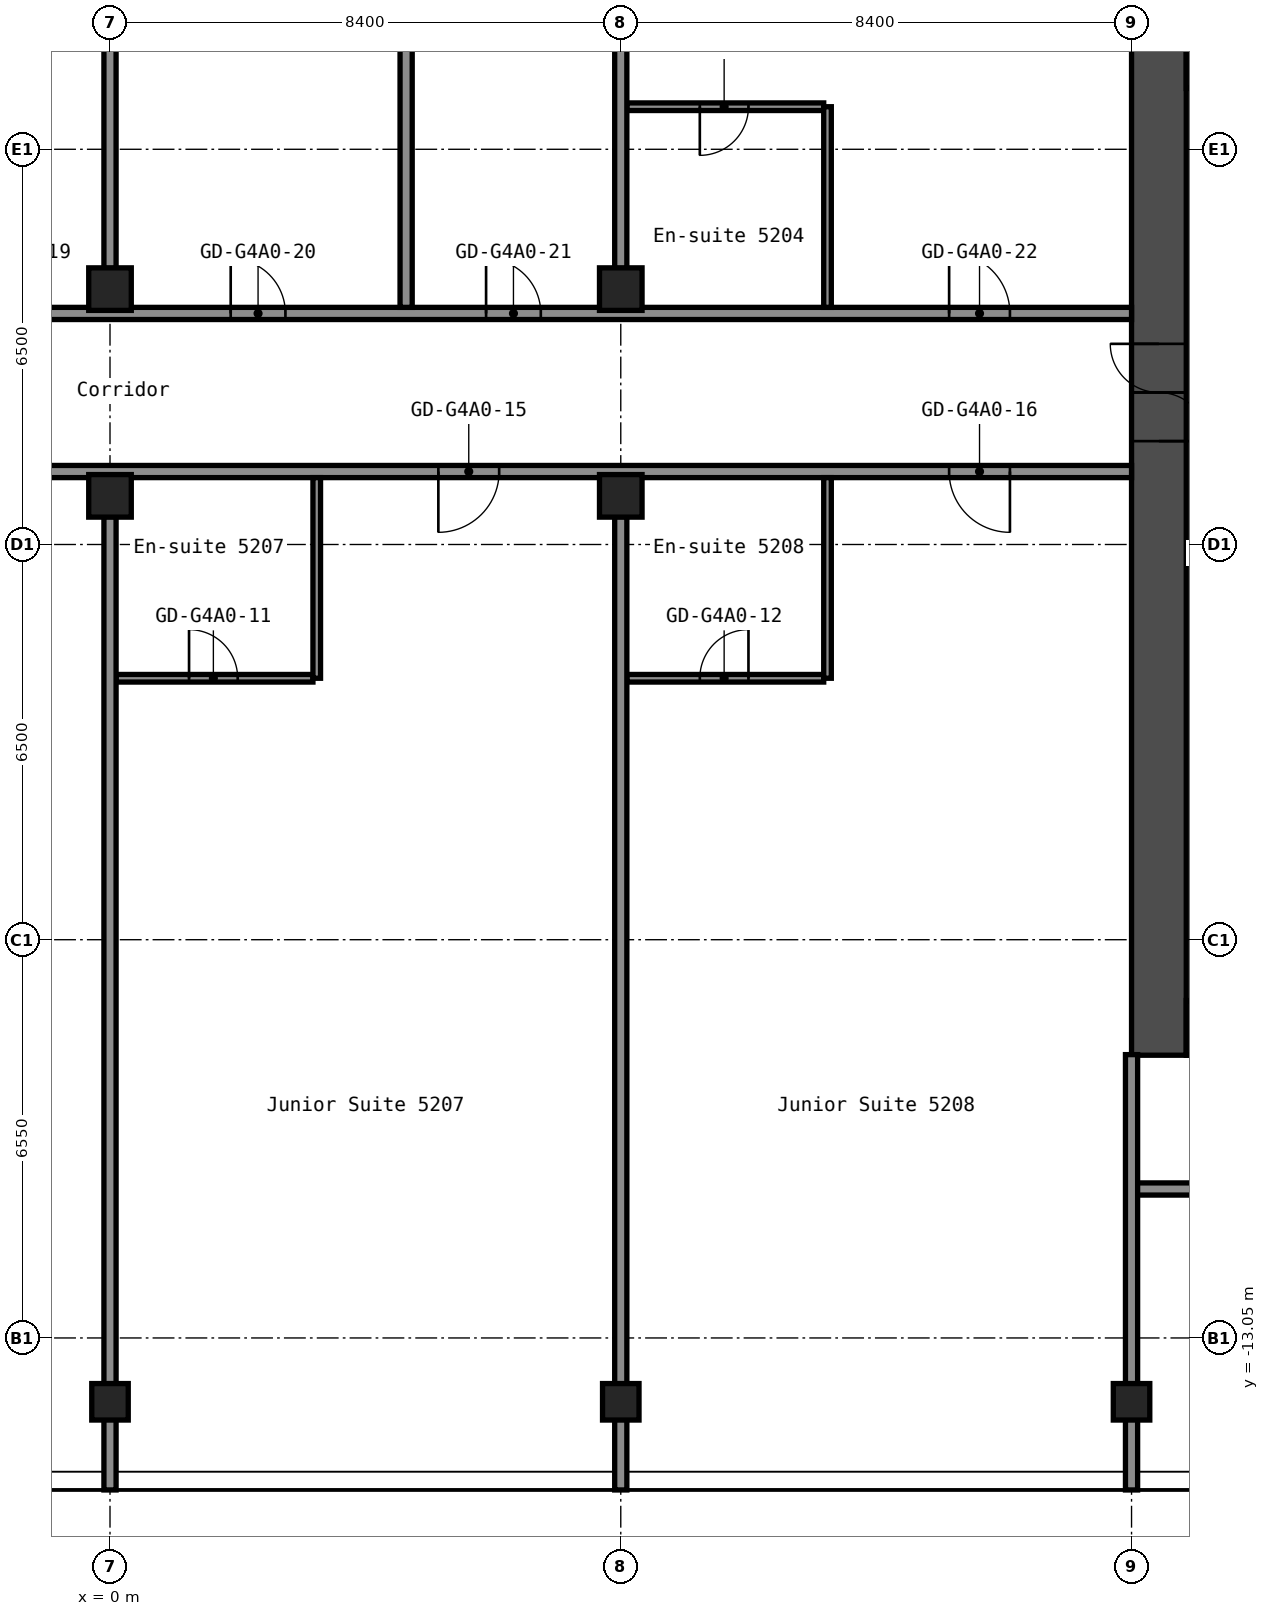
"""IFC4 building model, lengths in metres.
Left out: names, types, materials, properties, quantities, classifications, styles, units other than length and angle.
Written with IfcOpenShell. Run it as: python <this file> out.ifc"""

import sys

from ifc_helpers import new_model, si_unit, direction, frame, frame_2d, origin, origin_2d, place, context, subcontext, project, spatial, rectangle, hollow_rectangle, extrude, element, fill, save


model = new_model("IFC4")
c1 = context("Model", 3, precision=1e-05, world=origin(), true_north=direction((0.0, 1.0)))
c2 = subcontext(c1, "Body", "Model", "MODEL_VIEW")
j1 = project(units=[si_unit("LENGTHUNIT", "METRE"), si_unit("PLANEANGLEUNIT", "RADIAN")], contexts=[c1])
p1 = place(None, origin())
s1 = spatial("IfcSite", under=j1, at=p1, CompositionType="ELEMENT")
p2 = place(p1, origin())
s2 = spatial("IfcBuilding", under=s1, at=p2, CompositionType="ELEMENT")
p3 = place(p2, frame((0.0, 0.0, 186.6)))
s3 = spatial("IfcBuildingStorey", under=s2, at=p3, CompositionType="ELEMENT", Elevation=186.6)
p4 = place(p3, frame((0.0, -14.1, 0.0), z_axis=(0.0, 0.0, 1.0), x_axis=(1.0, 0.0, 0.0)))
e1 = element("IfcColumn", 1, at=p4, inside=s3, PredefinedType="COLUMN", context=c2, shape_type="SweptSolid", body=[
    extrude(hollow_rectangle(XDim=0.6, YDim=0.6, WallThickness=0.025, InnerFilletRadius=0.038, OuterFilletRadius=0.062, at=origin_2d()), origin(), (0.0, 0.0, 1.0), 2.75),
])
for number, where, z_axis, x_axis in (
    (2, (0.0, 0.8, 0.0), (0.0, 0.0, 1.0), (1.0, 0.0, 0.0)),
    (3, (0.0, 4.2, 0.0), (0.0, 0.0, 1.0), (1.0, 0.0, 0.0)),
):
    element("IfcColumn", number, at=place(p3, frame(where, z_axis=z_axis, x_axis=x_axis)), inside=s3, PredefinedType="COLUMN", context=c2, shape_type="SweptSolid", body=[
        extrude(hollow_rectangle(XDim=0.7, YDim=0.7, WallThickness=0.028, at=origin_2d()), origin(), (0.0, 0.0, 1.0), 2.75),
    ])
p5 = place(p3, frame((8.4, -14.1, 0.0), z_axis=(0.0, 0.0, 1.0), x_axis=(1.0, 0.0, 0.0)))
e4 = element("IfcColumn", 4, at=p5, inside=s3, PredefinedType="COLUMN", context=c2, shape_type="SweptSolid", body=[
    extrude(hollow_rectangle(XDim=0.6, YDim=0.6, WallThickness=0.025, InnerFilletRadius=0.038, OuterFilletRadius=0.062, at=origin_2d()), origin(), (0.0, 0.0, 1.0), 2.75),
])
for number, where, z_axis, x_axis in (
    (5, (8.4, 0.8, 0.0), (0.0, 0.0, 1.0), (1.0, 0.0, 0.0)),
    (6, (8.4, 4.2, 0.0), (0.0, 0.0, 1.0), (1.0, 0.0, 0.0)),
):
    element("IfcColumn", number, at=place(p3, frame(where, z_axis=z_axis, x_axis=x_axis)), inside=s3, PredefinedType="COLUMN", context=c2, shape_type="SweptSolid", body=[
        extrude(hollow_rectangle(XDim=0.7, YDim=0.7, WallThickness=0.028, at=origin_2d()), origin(), (0.0, 0.0, 1.0), 2.75),
    ])
p6 = place(p3, frame((16.8, -14.1, 0.0), z_axis=(0.0, 0.0, 1.0), x_axis=(1.0, 0.0, 0.0)))
e7 = element("IfcColumn", 7, at=p6, inside=s3, PredefinedType="COLUMN", context=c2, shape_type="SweptSolid", body=[
    extrude(hollow_rectangle(XDim=0.6, YDim=0.6, WallThickness=0.025, InnerFilletRadius=0.038, OuterFilletRadius=0.062, at=origin_2d()), origin(), (0.0, 0.0, 1.0), 2.75),
])
p7 = place(p3, frame((17.25, -8.4, 0.0), z_axis=(0.0, 0.0, 1.0), x_axis=(0.0, 1.0, 0.0)))
e8 = element("IfcWall", 8, at=p7, inside=s3, PredefinedType="SHEAR", context=c2, shape_type="SweptSolid", body=[
    extrude(rectangle(XDim=16.8, YDim=0.9, at=frame_2d((8.4, 0.0))), origin(), (0.0, 0.0, 1.0), 2.75),
])
p8 = place(p7, frame((10.1, 0.0, 0.0)))
e9 = element("IfcOpeningElement", 9, at=p8, cuts=e8, PredefinedType="OPENING", context=c2, shape_type="SweptSolid", body=[
    extrude(rectangle(XDim=1.6, YDim=2.1, at=frame_2d((0.8, 1.05))), frame((0.0, 0.46, 0.0), z_axis=(0.0, -1.0, 0.0), x_axis=(1.0, 0.0, 0.0)), (0.0, 0.0, 1.0), 0.92),
])
p9 = place(p3, frame((17.7, 7.95, 0.0), z_axis=(0.0, 0.0, 1.0), x_axis=(1.0, 0.0, 0.0)))
e10 = element("IfcWall", 10, at=p9, inside=s3, PredefinedType="SHEAR", context=c2, shape_type="SweptSolid", body=[
    extrude(rectangle(XDim=15.0, YDim=0.9, at=frame_2d((7.5, 0.0))), origin(), (0.0, 0.0, 1.0), 2.75),
])
p10 = place(p9, frame((10.4, 0.0, 0.0)))
e11 = element("IfcOpeningElement", 11, at=p10, cuts=e10, PredefinedType="OPENING", context=c2, shape_type="SweptSolid", body=[
    extrude(rectangle(XDim=1.2, YDim=2.1, at=frame_2d((0.6, 1.05))), frame((0.0, 0.46, 0.0), z_axis=(0.0, -1.0, 0.0), x_axis=(1.0, 0.0, 0.0)), (0.0, 0.0, 1.0), 0.92),
])
p11 = place(p9, frame((13.35, 0.0, 0.0)))
e12 = element("IfcOpeningElement", 12, at=p11, cuts=e10, PredefinedType="OPENING", context=c2, shape_type="SweptSolid", body=[
    extrude(rectangle(XDim=0.9, YDim=2.1, at=frame_2d((0.45, 1.05))), frame((0.0, 0.46, 0.0), z_axis=(0.0, -1.0, 0.0), x_axis=(1.0, 0.0, 0.0)), (0.0, 0.0, 1.0), 0.92),
])
p12 = place(p3, frame((17.7, -7.95, 0.0), z_axis=(0.0, 0.0, 1.0), x_axis=(1.0, 0.0, 0.0)))
e13 = element("IfcWall", 13, at=p12, inside=s3, PredefinedType="SHEAR", context=c2, shape_type="SweptSolid", body=[
    extrude(rectangle(XDim=15.0, YDim=0.9, at=frame_2d((7.5, 0.0))), origin(), (0.0, 0.0, 1.0), 2.75),
])
p13 = place(p12, frame((2.55, 0.0, 0.0)))
e14 = element("IfcOpeningElement", 14, at=p13, cuts=e13, PredefinedType="OPENING", context=c2, shape_type="SweptSolid", body=[
    extrude(rectangle(XDim=1.0, YDim=2.1, at=frame_2d((0.5, 1.05))), frame((0.0, 0.46, 0.0), z_axis=(0.0, -1.0, 0.0), x_axis=(1.0, 0.0, 0.0)), (0.0, 0.0, 1.0), 0.92),
])
p14 = place(p3, frame((16.8, -10.6, 0.0), z_axis=(0.0, 0.0, 1.0), x_axis=(1.0, 0.0, 0.0)))
e15 = element("IfcWall", 15, at=p14, inside=s3, PredefinedType="PARTITIONING", context=c2, shape_type="SweptSolid", body=[
    extrude(rectangle(XDim=21.3, YDim=0.2, at=frame_2d((10.65, 0.0))), origin(), (0.0, 0.0, 1.0), 2.75),
])
p15 = place(p14, frame((1.48, 0.0, 0.0)))
e16 = element("IfcOpeningElement", 16, at=p15, cuts=e15, PredefinedType="OPENING", context=c2, shape_type="SweptSolid", body=[
    extrude(rectangle(XDim=0.9, YDim=2.1, at=frame_2d((0.45, 1.05))), frame((0.0, 0.11, 0.0), z_axis=(0.0, -1.0, 0.0), x_axis=(1.0, 0.0, 0.0)), (0.0, 0.0, 1.0), 0.22),
])
p16 = place(p14, frame((5.68, 0.0, 0.0)))
e17 = element("IfcOpeningElement", 17, at=p16, cuts=e15, PredefinedType="OPENING", context=c2, shape_type="SweptSolid", body=[
    extrude(rectangle(XDim=0.9, YDim=2.1, at=frame_2d((0.45, 1.05))), frame((0.0, 0.11, 0.0), z_axis=(0.0, -1.0, 0.0), x_axis=(1.0, 0.0, 0.0)), (0.0, 0.0, 1.0), 0.22),
])
p17 = place(p14, frame((10.3, 0.0, 0.0)))
e18 = element("IfcOpeningElement", 18, at=p17, cuts=e15, PredefinedType="OPENING", context=c2, shape_type="SweptSolid", body=[
    extrude(rectangle(XDim=0.9, YDim=2.1, at=frame_2d((0.45, 1.05))), frame((0.0, 0.11, 0.0), z_axis=(0.0, -1.0, 0.0), x_axis=(1.0, 0.0, 0.0)), (0.0, 0.0, 1.0), 0.22),
])
p18 = place(p14, frame((14.5, 0.0, 0.0)))
e19 = element("IfcOpeningElement", 19, at=p18, cuts=e15, PredefinedType="OPENING", context=c2, shape_type="SweptSolid", body=[
    extrude(rectangle(XDim=0.9, YDim=2.1, at=frame_2d((0.45, 1.05))), frame((0.0, 0.11, 0.0), z_axis=(0.0, -1.0, 0.0), x_axis=(1.0, 0.0, 0.0)), (0.0, 0.0, 1.0), 0.22),
])
p19 = place(p14, frame((18.45, 0.0, 0.0)))
e20 = element("IfcOpeningElement", 20, at=p19, cuts=e15, PredefinedType="OPENING", context=c2, shape_type="SweptSolid", body=[
    extrude(rectangle(XDim=0.9, YDim=2.1, at=frame_2d((0.45, 1.05))), frame((0.0, 0.11, 0.0), z_axis=(0.0, -1.0, 0.0), x_axis=(1.0, 0.0, 0.0)), (0.0, 0.0, 1.0), 0.22),
])
p20 = place(p3, frame((0.1, -2.2, 0.0), z_axis=(0.0, 0.0, 1.0), x_axis=(1.0, 0.0, 0.0)))
e21 = element("IfcWall", 21, at=p20, inside=s3, PredefinedType="PARTITIONING", context=c2, shape_type="SweptSolid", body=[
    extrude(rectangle(XDim=3.237, YDim=0.125, at=frame_2d((1.619, 0.0))), origin(), (0.0, 0.0, 1.0), 2.75),
])
p21 = place(p20, frame((1.2, 0.0, 0.0)))
e22 = element("IfcOpeningElement", 22, at=p21, cuts=e21, PredefinedType="OPENING", context=c2, shape_type="SweptSolid", body=[
    extrude(rectangle(XDim=0.8, YDim=2.1, at=frame_2d((0.4, 1.05))), frame((0.0, 0.073, 0.0), z_axis=(0.0, -1.0, 0.0), x_axis=(1.0, 0.0, 0.0)), (0.0, 0.0, 1.0), 0.145),
])
p22 = place(p3, frame((8.5, -2.2, 0.0), z_axis=(0.0, 0.0, 1.0), x_axis=(1.0, 0.0, 0.0)))
e23 = element("IfcWall", 23, at=p22, inside=s3, PredefinedType="PARTITIONING", context=c2, shape_type="SweptSolid", body=[
    extrude(rectangle(XDim=3.238, YDim=0.125, at=frame_2d((1.619, 0.0))), origin(), (0.0, 0.0, 1.0), 2.75),
])
p23 = place(p22, frame((1.2, 0.0, 0.0)))
e24 = element("IfcOpeningElement", 24, at=p23, cuts=e23, PredefinedType="OPENING", context=c2, shape_type="SweptSolid", body=[
    extrude(rectangle(XDim=0.8, YDim=2.1, at=frame_2d((0.4, 1.05))), frame((0.0, 0.073, 0.0), z_axis=(0.0, -1.0, 0.0), x_axis=(1.0, 0.0, 0.0)), (0.0, 0.0, 1.0), 0.145),
])
p24 = place(p3, frame((-16.8, 1.2, 0.0), z_axis=(0.0, 0.0, 1.0), x_axis=(1.0, 0.0, 0.0)))
e25 = element("IfcWall", 25, at=p24, inside=s3, PredefinedType="PARTITIONING", context=c2, shape_type="SweptSolid", body=[
    extrude(rectangle(XDim=33.6, YDim=0.2, at=frame_2d((16.8, 0.0))), origin(), (0.0, 0.0, 1.0), 2.75),
])
p25 = place(p24, frame((5.5, 0.0, 0.0)))
e26 = element("IfcOpeningElement", 26, at=p25, cuts=e25, PredefinedType="OPENING", context=c2, shape_type="SweptSolid", body=[
    extrude(rectangle(XDim=1.0, YDim=2.1, at=frame_2d((0.5, 1.05))), frame((0.0, 0.11, 0.0), z_axis=(0.0, -1.0, 0.0), x_axis=(1.0, 0.0, 0.0)), (0.0, 0.0, 1.0), 0.22),
])
p26 = place(p24, frame((12.1, 0.0, 0.0)))
e27 = element("IfcOpeningElement", 27, at=p26, cuts=e25, PredefinedType="OPENING", context=c2, shape_type="SweptSolid", body=[
    extrude(rectangle(XDim=1.0, YDim=2.1, at=frame_2d((0.5, 1.05))), frame((0.0, 0.11, 0.0), z_axis=(0.0, -1.0, 0.0), x_axis=(1.0, 0.0, 0.0)), (0.0, 0.0, 1.0), 0.22),
])
p27 = place(p24, frame((22.2, 0.0, 0.0)))
e28 = element("IfcOpeningElement", 28, at=p27, cuts=e25, PredefinedType="OPENING", context=c2, shape_type="SweptSolid", body=[
    extrude(rectangle(XDim=1.0, YDim=2.1, at=frame_2d((0.5, 1.05))), frame((0.0, 0.11, 0.0), z_axis=(0.0, -1.0, 0.0), x_axis=(1.0, 0.0, 0.0)), (0.0, 0.0, 1.0), 0.22),
])
p28 = place(p24, frame((30.6, 0.0, 0.0)))
e29 = element("IfcOpeningElement", 29, at=p28, cuts=e25, PredefinedType="OPENING", context=c2, shape_type="SweptSolid", body=[
    extrude(rectangle(XDim=1.0, YDim=2.1, at=frame_2d((0.5, 1.05))), frame((0.0, 0.11, 0.0), z_axis=(0.0, -1.0, 0.0), x_axis=(1.0, 0.0, 0.0)), (0.0, 0.0, 1.0), 0.22),
])
p29 = place(p3, frame((-16.8, 3.8, 0.0), z_axis=(0.0, 0.0, 1.0), x_axis=(1.0, 0.0, 0.0)))
e30 = element("IfcWall", 30, at=p29, inside=s3, PredefinedType="PARTITIONING", context=c2, shape_type="SweptSolid", body=[
    extrude(rectangle(XDim=33.6, YDim=0.2, at=frame_2d((16.8, 0.0))), origin(), (0.0, 0.0, 1.0), 2.75),
])
p30 = place(p29, frame((2.0, 0.0, 0.0)))
e31 = element("IfcOpeningElement", 31, at=p30, cuts=e30, PredefinedType="OPENING", context=c2, shape_type="SweptSolid", body=[
    extrude(rectangle(XDim=1.0, YDim=2.1, at=frame_2d((0.5, 1.05))), frame((0.0, 0.11, 0.0), z_axis=(0.0, -1.0, 0.0), x_axis=(1.0, 0.0, 0.0)), (0.0, 0.0, 1.0), 0.22),
])
p31 = place(p29, frame((10.555, 0.0, 0.0)))
e32 = element("IfcOpeningElement", 32, at=p31, cuts=e30, PredefinedType="OPENING", context=c2, shape_type="SweptSolid", body=[
    extrude(rectangle(XDim=0.9, YDim=2.1, at=frame_2d((0.45, 1.05))), frame((0.0, 0.11, 0.0), z_axis=(0.0, -1.0, 0.0), x_axis=(1.0, 0.0, 0.0)), (0.0, 0.0, 1.0), 0.22),
])
p32 = place(p29, frame((14.755, 0.0, 0.0)))
e33 = element("IfcOpeningElement", 33, at=p32, cuts=e30, PredefinedType="OPENING", context=c2, shape_type="SweptSolid", body=[
    extrude(rectangle(XDim=0.9, YDim=2.1, at=frame_2d((0.45, 1.05))), frame((0.0, 0.11, 0.0), z_axis=(0.0, -1.0, 0.0), x_axis=(1.0, 0.0, 0.0)), (0.0, 0.0, 1.0), 0.22),
])
p33 = place(p29, frame((18.785, 0.0, 0.0)))
e34 = element("IfcOpeningElement", 34, at=p33, cuts=e30, PredefinedType="OPENING", context=c2, shape_type="SweptSolid", body=[
    extrude(rectangle(XDim=0.9, YDim=2.1, at=frame_2d((0.45, 1.05))), frame((0.0, 0.11, 0.0), z_axis=(0.0, -1.0, 0.0), x_axis=(1.0, 0.0, 0.0)), (0.0, 0.0, 1.0), 0.22),
])
p34 = place(p29, frame((22.985, 0.0, 0.0)))
e35 = element("IfcOpeningElement", 35, at=p34, cuts=e30, PredefinedType="OPENING", context=c2, shape_type="SweptSolid", body=[
    extrude(rectangle(XDim=0.9, YDim=2.1, at=frame_2d((0.45, 1.05))), frame((0.0, 0.11, 0.0), z_axis=(0.0, -1.0, 0.0), x_axis=(1.0, 0.0, 0.0)), (0.0, 0.0, 1.0), 0.22),
])
p35 = place(p29, frame((30.6, 0.0, 0.0)))
e36 = element("IfcOpeningElement", 36, at=p35, cuts=e30, PredefinedType="OPENING", context=c2, shape_type="SweptSolid", body=[
    extrude(rectangle(XDim=1.0, YDim=2.1, at=frame_2d((0.5, 1.05))), frame((0.0, 0.11, 0.0), z_axis=(0.0, -1.0, 0.0), x_axis=(1.0, 0.0, 0.0)), (0.0, 0.0, 1.0), 0.22),
])
p36 = place(p3, frame((8.5, 7.2, 0.0), z_axis=(0.0, 0.0, 1.0), x_axis=(1.0, 0.0, 0.0)))
e37 = element("IfcWall", 37, at=p36, inside=s3, PredefinedType="PARTITIONING", context=c2, shape_type="SweptSolid", body=[
    extrude(rectangle(XDim=3.238, YDim=0.125, at=frame_2d((1.619, 0.0))), origin(), (0.0, 0.0, 1.0), 2.75),
])
p37 = place(p36, frame((1.2, 0.0, 0.0)))
e38 = element("IfcOpeningElement", 38, at=p37, cuts=e37, PredefinedType="OPENING", context=c2, shape_type="SweptSolid", body=[
    extrude(rectangle(XDim=0.8, YDim=2.1, at=frame_2d((0.4, 1.05))), frame((0.0, 0.073, 0.0), z_axis=(0.0, -1.0, 0.0), x_axis=(1.0, 0.0, 0.0)), (0.0, 0.0, 1.0), 0.145),
])
for number, where, z_axis, x_axis in (
    (39, (0.0, -15.55, 0.0), (0.0, 0.0, 1.0), (0.0, 1.0, 0.0)),
    (40, (0.0, 4.54, 0.0), (0.0, 0.0, 1.0), (0.0, 1.0, 0.0)),
):
    element("IfcWall", number, at=place(p3, frame(where, z_axis=z_axis, x_axis=x_axis)), inside=s3, PredefinedType="PARTITIONING", context=c2, shape_type="SweptSolid", body=[
        extrude(rectangle(XDim=16.01, YDim=0.2, at=frame_2d((8.005, 0.0))), origin(), (0.0, 0.0, 1.0), 2.75),
    ])
p38 = place(p3, frame((3.4, -2.2, 0.0), z_axis=(0.0, 0.0, 1.0), x_axis=(0.0, 1.0, 0.0)))
e41 = element("IfcWall", 41, at=p38, inside=s3, PredefinedType="PARTITIONING", context=c2, shape_type="SweptSolid", body=[
    extrude(rectangle(XDim=3.3, YDim=0.125, at=frame_2d((1.65, 0.0))), origin(), (0.0, 0.0, 1.0), 2.75),
])
p39 = place(p3, frame((4.87, 3.9, 0.0), z_axis=(0.0, 0.0, 1.0), x_axis=(0.0, 1.0, 0.0)))
e42 = element("IfcWall", 42, at=p39, inside=s3, PredefinedType="PARTITIONING", context=c2, shape_type="SweptSolid", body=[
    extrude(rectangle(XDim=16.65, YDim=0.2, at=frame_2d((8.325, 0.0))), origin(), (0.0, 0.0, 1.0), 2.75),
])
for number, where, z_axis, x_axis in (
    (43, (8.4, -15.55, 0.0), (0.0, 0.0, 1.0), (0.0, 1.0, 0.0)),
    (44, (8.4, 4.54, 0.0), (0.0, 0.0, 1.0), (0.0, 1.0, 0.0)),
):
    element("IfcWall", number, at=place(p3, frame(where, z_axis=z_axis, x_axis=x_axis)), inside=s3, PredefinedType="PARTITIONING", context=c2, shape_type="SweptSolid", body=[
        extrude(rectangle(XDim=16.01, YDim=0.2, at=frame_2d((8.005, 0.0))), origin(), (0.0, 0.0, 1.0), 2.75),
    ])
for number, where, z_axis, x_axis in (
    (45, (11.8, -2.2, 0.0), (0.0, 0.0, 1.0), (0.0, 1.0, 0.0)),
    (46, (11.8, 3.9, 0.0), (0.0, 0.0, 1.0), (0.0, 1.0, 0.0)),
):
    element("IfcWall", number, at=place(p3, frame(where, z_axis=z_axis, x_axis=x_axis)), inside=s3, PredefinedType="PARTITIONING", context=c2, shape_type="SweptSolid", body=[
        extrude(rectangle(XDim=3.3, YDim=0.125, at=frame_2d((1.65, 0.0))), origin(), (0.0, 0.0, 1.0), 2.75),
    ])
p40 = place(p3, frame((16.8, -15.55, 0.0), z_axis=(0.0, 0.0, 1.0), x_axis=(0.0, 1.0, 0.0)))
e47 = element("IfcWall", 47, at=p40, inside=s3, PredefinedType="PARTITIONING", context=c2, shape_type="SweptSolid", body=[
    extrude(rectangle(XDim=7.16, YDim=0.2, at=frame_2d((3.58, 0.0))), origin(), (0.0, 0.0, 1.0), 2.75),
])
p41 = place(p8, origin())
e48 = element("IfcDoor", 48, at=p41, inside=s3, OperationType="DOUBLE_DOOR_SINGLE_SWING", PredefinedType="DOOR", context=c2, shape_type="SweptSolid", body=[
    extrude(rectangle(XDim=1.6, YDim=2.1, at=frame_2d((0.8, 1.05))), frame((0.0, 0.025, 0.0), z_axis=(0.0, -1.0, 0.0), x_axis=(1.0, 0.0, 0.0)), (0.0, 0.0, 1.0), 0.05),
])
fill(e9, e48)
p42 = place(p21, origin())
e49 = element("IfcDoor", 49, at=p42, inside=s3, OperationType="SINGLE_SWING_RIGHT", PredefinedType="DOOR", context=c2, shape_type="SweptSolid", body=[
    extrude(rectangle(XDim=0.8, YDim=2.1, at=frame_2d((0.4, 1.05))), frame((0.0, 0.025, 0.0), z_axis=(0.0, -1.0, 0.0), x_axis=(1.0, 0.0, 0.0)), (0.0, 0.0, 1.0), 0.05),
])
fill(e22, e49)
p43 = place(p23, origin())
e50 = element("IfcDoor", 50, at=p43, inside=s3, OperationType="SINGLE_SWING_LEFT", PredefinedType="DOOR", context=c2, shape_type="SweptSolid", body=[
    extrude(rectangle(XDim=0.8, YDim=2.1, at=frame_2d((0.4, 1.05))), frame((0.0, 0.025, 0.0), z_axis=(0.0, -1.0, 0.0), x_axis=(1.0, 0.0, 0.0)), (0.0, 0.0, 1.0), 0.05),
])
fill(e24, e50)
p44 = place(p27, origin())
e51 = element("IfcDoor", 51, at=p44, inside=s3, OperationType="SINGLE_SWING_LEFT", PredefinedType="DOOR", context=c2, shape_type="SweptSolid", body=[
    extrude(rectangle(XDim=1.0, YDim=2.1, at=frame_2d((0.5, 1.05))), frame((0.0, 0.025, 0.0), z_axis=(0.0, -1.0, 0.0), x_axis=(1.0, 0.0, 0.0)), (0.0, 0.0, 1.0), 0.05),
])
fill(e28, e51)
p45 = place(p28, origin())
e52 = element("IfcDoor", 52, at=p45, inside=s3, OperationType="SINGLE_SWING_RIGHT", PredefinedType="DOOR", context=c2, shape_type="SweptSolid", body=[
    extrude(rectangle(XDim=1.0, YDim=2.1, at=frame_2d((0.5, 1.05))), frame((0.0, 0.025, 0.0), z_axis=(0.0, -1.0, 0.0), x_axis=(1.0, 0.0, 0.0)), (0.0, 0.0, 1.0), 0.05),
])
fill(e29, e52)
p46 = place(p33, origin())
e53 = element("IfcDoor", 53, at=p46, inside=s3, OperationType="SINGLE_SWING_RIGHT", PredefinedType="DOOR", context=c2, shape_type="SweptSolid", body=[
    extrude(rectangle(XDim=0.9, YDim=2.1, at=frame_2d((0.45, 1.05))), frame((0.0, 0.025, 0.0), z_axis=(0.0, -1.0, 0.0), x_axis=(1.0, 0.0, 0.0)), (0.0, 0.0, 1.0), 0.05),
])
fill(e34, e53)
p47 = place(p34, origin())
e54 = element("IfcDoor", 54, at=p47, inside=s3, OperationType="SINGLE_SWING_RIGHT", PredefinedType="DOOR", context=c2, shape_type="SweptSolid", body=[
    extrude(rectangle(XDim=0.9, YDim=2.1, at=frame_2d((0.45, 1.05))), frame((0.0, 0.025, 0.0), z_axis=(0.0, -1.0, 0.0), x_axis=(1.0, 0.0, 0.0)), (0.0, 0.0, 1.0), 0.05),
])
fill(e35, e54)
p48 = place(p35, origin())
e55 = element("IfcDoor", 55, at=p48, inside=s3, OperationType="SINGLE_SWING_RIGHT", PredefinedType="DOOR", context=c2, shape_type="SweptSolid", body=[
    extrude(rectangle(XDim=1.0, YDim=2.1, at=frame_2d((0.5, 1.05))), frame((0.0, 0.025, 0.0), z_axis=(0.0, -1.0, 0.0), x_axis=(1.0, 0.0, 0.0)), (0.0, 0.0, 1.0), 0.05),
])
fill(e36, e55)
p49 = place(p37, origin())
e56 = element("IfcDoor", 56, at=p49, inside=s3, OperationType="SINGLE_SWING_LEFT", PredefinedType="DOOR", context=c2, shape_type="SweptSolid", body=[
    extrude(rectangle(XDim=0.8, YDim=2.1, at=frame_2d((0.4, 1.05))), frame((0.0, 0.025, 0.0), z_axis=(0.0, -1.0, 0.0), x_axis=(1.0, 0.0, 0.0)), (0.0, 0.0, 1.0), 0.05),
])
fill(e38, e56)
save(model, sys.argv[1])
